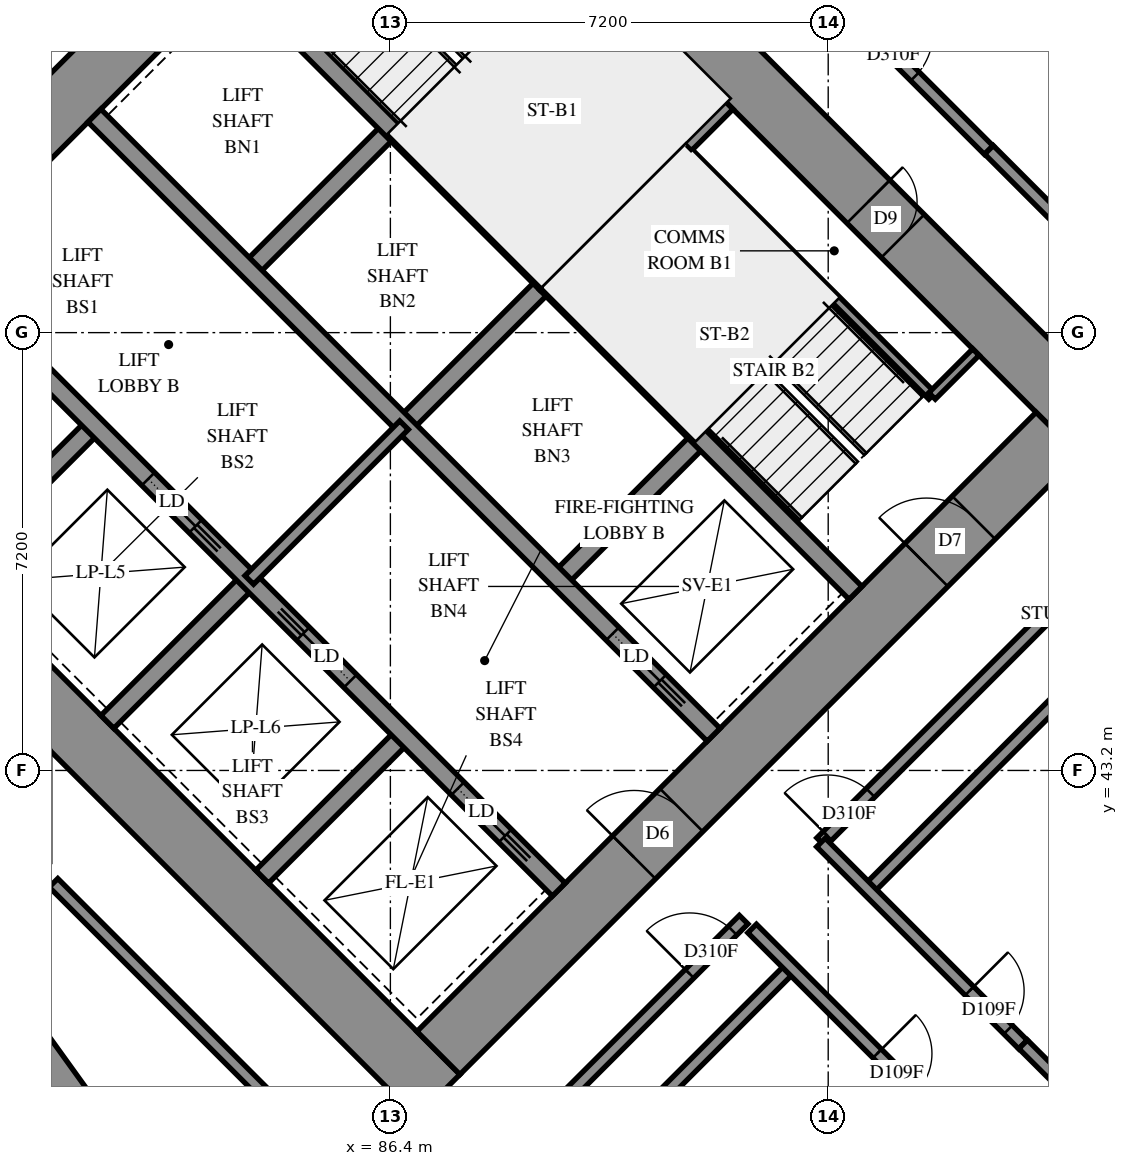
"""IFC4 building model, lengths in metres.
Left out: names, types, materials, properties, quantities, classifications, styles, units other than length and angle.
Written with IfcOpenShell. Run it as: python <this file> out.ifc"""

import sys

from ifc_helpers import new_model, si_unit, direction, frame, frame_2d, origin, place, context, subcontext, project, spatial, polyline, rectangle, outline, extrude, element, fill, save


model = new_model("IFC4")
c1 = context("Model", 3, precision=1e-05, world=origin(), true_north=direction((0.0, 1.0)))
c2 = subcontext(c1, "Body", "Model", "MODEL_VIEW")
j1 = project(units=[si_unit("LENGTHUNIT", "METRE"), si_unit("PLANEANGLEUNIT", "RADIAN")], contexts=[c1])
p1 = place(None, origin())
s1 = spatial("IfcSite", under=j1, at=p1, CompositionType="ELEMENT")
p2 = place(p1, origin())
s2 = spatial("IfcBuilding", under=s1, at=p2, CompositionType="ELEMENT")
p3 = place(p2, frame((0.0, 0.0, 64.4)))
s3 = spatial("IfcBuildingStorey", under=s2, at=p3, CompositionType="ELEMENT", Elevation=64.4)
p4 = place(p3, frame((75.594, 49.443, -0.3), z_axis=(0.0, 0.0, 1.0), x_axis=(0.7071037324, -0.70710983, 0.0)))
e1 = element("IfcWall", 1, at=p4, inside=s3, PredefinedType="SHEAR", context=c2, shape_type="SweptSolid", body=[
    extrude(rectangle(XDim=16.4, YDim=1.0, at=frame_2d((8.2, 0.0))), origin(), (0.0, 0.0, 1.0), 2.7),
])
p5 = place(p3, frame((86.483, 60.333, -0.3), z_axis=(0.0, 0.0, 1.0), x_axis=(0.70710983, -0.7071037324, 0.0)))
e2 = element("IfcWall", 2, at=p5, inside=s3, PredefinedType="SHEAR", context=c2, shape_type="SweptSolid", body=[
    extrude(rectangle(XDim=16.4, YDim=1.0, at=frame_2d((8.2, 0.0))), origin(), (0.0, 0.0, 1.0), 2.7),
])
p6 = place(p5, frame((11.0, 0.0, 0.3)))
e3 = element("IfcOpeningElement", 3, at=p6, cuts=e2, PredefinedType="OPENING", context=c2, shape_type="SweptSolid", body=[
    extrude(rectangle(XDim=0.8, YDim=2.1, at=frame_2d((0.4, 1.05))), frame((0.0, 0.51, 0.0), z_axis=(0.0, -1.0, 0.0), x_axis=(1.0, 0.0, 0.0)), (0.0, 0.0, 1.0), 1.02),
])
p7 = place(p3, frame((76.301, 49.443, -0.3), z_axis=(0.0, 0.0, 1.0), x_axis=(0.7071067812, 0.7071067812, 0.0)))
e4 = element("IfcWall", 4, at=p7, inside=s3, PredefinedType="SHEAR", context=c2, shape_type="SweptSolid", body=[
    extrude(rectangle(XDim=14.4, YDim=1.0, at=frame_2d((7.2, 0.0))), origin(), (0.0, 0.0, 1.0), 2.7),
])
p8 = place(p7, frame((4.55, 0.0, 0.3)))
e5 = element("IfcOpeningElement", 5, at=p8, cuts=e4, PredefinedType="OPENING", context=c2, shape_type="SweptSolid", body=[
    extrude(rectangle(XDim=1.1, YDim=2.1, at=frame_2d((0.55, 1.05))), frame((0.0, 0.51, 0.0), z_axis=(0.0, -1.0, 0.0), x_axis=(1.0, 0.0, 0.0)), (0.0, 0.0, 1.0), 1.02),
])
p9 = place(p7, frame((11.35, 0.0, 0.3)))
e6 = element("IfcOpeningElement", 6, at=p9, cuts=e4, PredefinedType="OPENING", context=c2, shape_type="SweptSolid", body=[
    extrude(rectangle(XDim=1.1, YDim=2.1, at=frame_2d((0.55, 1.05))), frame((0.0, 0.51, 0.0), z_axis=(0.0, -1.0, 0.0), x_axis=(1.0, 0.0, 0.0)), (0.0, 0.0, 1.0), 1.02),
])
p10 = place(p3, frame((87.19, 38.554, -0.3), z_axis=(0.0, 0.0, 1.0), x_axis=(0.707103309, 0.7071102534, 0.0)))
e7 = element("IfcWall", 7, at=p10, inside=s3, PredefinedType="SHEAR", context=c2, shape_type="SweptSolid", body=[
    extrude(rectangle(XDim=14.4, YDim=1.0, at=frame_2d((7.2, 0.0))), origin(), (0.0, 0.0, 1.0), 2.7),
])
p11 = place(p10, frame((4.55, 0.0, 0.3)))
e8 = element("IfcOpeningElement", 8, at=p11, cuts=e7, PredefinedType="OPENING", context=c2, shape_type="SweptSolid", body=[
    extrude(rectangle(XDim=1.1, YDim=2.1, at=frame_2d((0.55, 1.05))), frame((0.0, 0.51, 0.0), z_axis=(0.0, -1.0, 0.0), x_axis=(1.0, 0.0, 0.0)), (0.0, 0.0, 1.0), 1.02),
])
p12 = place(p10, frame((11.35, 0.0, 0.3)))
e9 = element("IfcOpeningElement", 9, at=p12, cuts=e7, PredefinedType="OPENING", context=c2, shape_type="SweptSolid", body=[
    extrude(rectangle(XDim=1.1, YDim=2.1, at=frame_2d((0.55, 1.05))), frame((0.0, 0.51, 0.0), z_axis=(0.0, -1.0, 0.0), x_axis=(1.0, 0.0, 0.0)), (0.0, 0.0, 1.0), 1.02),
])
for number, where, z_axis, x_axis in (
    (10, (79.2, 46.544, 0.0), (0.0, 0.0, 1.0), (0.707, 0.707, 0.0)),
    (11, (84.079, 51.423, 0.0), (0.0, 0.0, 1.0), (0.707, 0.707, 0.0)),
):
    element("IfcWall", number, at=place(p3, frame(where, z_axis=z_axis, x_axis=x_axis)), inside=s3, PredefinedType="SOLIDWALL", context=c2, shape_type="SweptSolid", body=[
        extrude(rectangle(XDim=3.3, YDim=0.3, at=frame_2d((1.65, 0.0))), origin(), (0.0, 0.0, 1.0), 3.1),
    ])
p13 = place(p3, frame((81.746, 43.999, 0.0), z_axis=(0.0, 0.0, 1.0), x_axis=(0.7071067812, 0.7071067812, 0.0)))
e12 = element("IfcWall", 12, at=p13, inside=s3, PredefinedType="SOLIDWALL", context=c2, shape_type="SweptSolid", body=[
    extrude(rectangle(XDim=3.3, YDim=0.3, at=frame_2d((1.65, 0.0))), origin(), (0.0, 0.0, 1.0), 3.1),
])
p14 = place(p3, frame((86.625, 48.878, 0.0), z_axis=(0.0, 0.0, 1.0), x_axis=(0.7071067812, 0.7071067812, 0.0)))
e13 = element("IfcWall", 13, at=p14, inside=s3, PredefinedType="SOLIDWALL", context=c2, shape_type="SweptSolid", body=[
    extrude(rectangle(XDim=3.3, YDim=0.3, at=frame_2d((1.65, 0.0))), origin(), (0.0, 0.0, 1.0), 3.1),
])
p15 = place(p3, frame((84.291, 41.453, 0.0), z_axis=(0.0, 0.0, 1.0), x_axis=(0.7071067812, 0.7071067812, 0.0)))
e14 = element("IfcWall", 14, at=p15, inside=s3, PredefinedType="SOLIDWALL", context=c2, shape_type="SweptSolid", body=[
    extrude(rectangle(XDim=3.3, YDim=0.3, at=frame_2d((1.65, 0.0))), origin(), (0.0, 0.0, 1.0), 3.1),
])
p16 = place(p3, frame((89.17, 46.332, 0.0), z_axis=(0.0, 0.0, 1.0), x_axis=(0.7071067812, 0.7071067812, 0.0)))
e15 = element("IfcWall", 15, at=p16, inside=s3, PredefinedType="SOLIDWALL", context=c2, shape_type="SweptSolid", body=[
    extrude(rectangle(XDim=3.3, YDim=0.3, at=frame_2d((1.65, 0.0))), origin(), (0.0, 0.0, 1.0), 3.1),
])
p17 = place(p3, frame((78.988, 51.423, 0.0), z_axis=(0.0, 0.0, 1.0), x_axis=(0.7071067812, -0.7071067812, 0.0)))
e16 = element("IfcWall", 16, at=p17, inside=s3, PredefinedType="SOLIDWALL", context=c2, shape_type="SweptSolid", body=[
    extrude(rectangle(XDim=14.4, YDim=0.3, at=frame_2d((7.2, 0.0))), origin(), (0.0, 0.0, 1.0), 3.1),
])
p18 = place(p17, frame((1.25, 0.0, 0.0)))
e17 = element("IfcOpeningElement", 17, at=p18, cuts=e16, PredefinedType="OPENING", context=c2, shape_type="SweptSolid", body=[
    extrude(rectangle(XDim=1.1, YDim=2.1, at=frame_2d((0.55, 1.05))), frame((0.0, 0.16, 0.0), z_axis=(0.0, -1.0, 0.0), x_axis=(1.0, 0.0, 0.0)), (0.0, 0.0, 1.0), 0.32),
])
p19 = place(p17, frame((4.85, 0.0, 0.0)))
e18 = element("IfcOpeningElement", 18, at=p19, cuts=e16, PredefinedType="OPENING", context=c2, shape_type="SweptSolid", body=[
    extrude(rectangle(XDim=1.1, YDim=2.1, at=frame_2d((0.55, 1.05))), frame((0.0, 0.16, 0.0), z_axis=(0.0, -1.0, 0.0), x_axis=(1.0, 0.0, 0.0)), (0.0, 0.0, 1.0), 0.32),
])
p20 = place(p17, frame((8.45, 0.0, 0.0)))
e19 = element("IfcOpeningElement", 19, at=p20, cuts=e16, PredefinedType="OPENING", context=c2, shape_type="SweptSolid", body=[
    extrude(rectangle(XDim=1.1, YDim=2.1, at=frame_2d((0.55, 1.05))), frame((0.0, 0.16, 0.0), z_axis=(0.0, -1.0, 0.0), x_axis=(1.0, 0.0, 0.0)), (0.0, 0.0, 1.0), 0.32),
])
p21 = place(p17, frame((12.05, 0.0, 0.0)))
e20 = element("IfcOpeningElement", 20, at=p21, cuts=e16, PredefinedType="OPENING", context=c2, shape_type="SweptSolid", body=[
    extrude(rectangle(XDim=1.1, YDim=2.1, at=frame_2d((0.55, 1.05))), frame((0.0, 0.16, 0.0), z_axis=(0.0, -1.0, 0.0), x_axis=(1.0, 0.0, 0.0)), (0.0, 0.0, 1.0), 0.32),
])
p22 = place(p3, frame((81.534, 53.969, 0.0), z_axis=(0.0, 0.0, 1.0), x_axis=(0.707103309, -0.7071102534, 0.0)))
e21 = element("IfcWall", 21, at=p22, inside=s3, PredefinedType="SOLIDWALL", context=c2, shape_type="SweptSolid", body=[
    extrude(rectangle(XDim=14.4, YDim=0.3, at=frame_2d((7.2, 0.0))), origin(), (0.0, 0.0, 1.0), 3.1),
])
p23 = place(p22, frame((12.05, 0.0, 0.0)))
e22 = element("IfcOpeningElement", 22, at=p23, cuts=e21, PredefinedType="OPENING", context=c2, shape_type="SweptSolid", body=[
    extrude(rectangle(XDim=1.1, YDim=2.1, at=frame_2d((0.55, 1.05))), frame((0.0, 0.16, 0.0), z_axis=(0.0, -1.0, 0.0), x_axis=(1.0, 0.0, 0.0)), (0.0, 0.0, 1.0), 0.32),
])
for number, where, z_axis, x_axis in (
    (23, (83.867, 56.302, 0.0), (0.0, 0.0, 1.0), (0.707, -0.707, 0.0)),
    (24, (88.958, 51.211, 0.0), (0.0, 0.0, 1.0), (0.707, -0.707, 0.0)),
):
    element("IfcWall", number, at=place(p3, frame(where, z_axis=z_axis, x_axis=x_axis)), inside=s3, PredefinedType="SOLIDWALL", context=c2, shape_type="SweptSolid", body=[
        extrude(rectangle(XDim=7.2, YDim=0.3, at=frame_2d((3.6, 0.0))), origin(), (0.0, 0.0, 1.0), 3.1),
    ])
p24 = place(p3, frame((88.958, 51.211, 0.0), z_axis=(0.0, 0.0, 1.0), x_axis=(0.7071067812, 0.7071067812, 0.0)))
e25 = element("IfcWall", 25, at=p24, inside=s3, PredefinedType="SOLIDWALL", context=c2, shape_type="SweptSolid", body=[
    extrude(rectangle(XDim=4.2, YDim=0.3, at=frame_2d((2.1, 0.0))), origin(), (0.0, 0.0, 1.0), 3.1),
])
p25 = place(p3, frame((99.031, 54.362, 0.0), z_axis=(0.0, 0.0, 1.0), x_axis=(-0.8229669617, 0.5680892359, 0.0)))
e26 = element("IfcWall", 26, at=p25, inside=s3, PredefinedType="SOLIDWALL", context=c2, shape_type="SweptSolid", body=[
    extrude(outline(polyline([(-0.05, -0.275), (3.445, -0.275), (3.546, 0.275), (0.05, 0.275), (-0.05, -0.275)])), origin(), (0.0, 0.0, 1.0), 3.1),
])
p26 = place(p25, frame((1.706, 0.0, 0.5)))
e27 = element("IfcOpeningElement", 27, at=p26, cuts=e26, PredefinedType="OPENING", context=c2, shape_type="SweptSolid", body=[
    extrude(rectangle(XDim=1.2, YDim=2.45, at=frame_2d((0.6, 1.225))), frame((0.0, 0.285, 0.0), z_axis=(0.0, -1.0, 0.0), x_axis=(1.0, 0.0, 0.0)), (0.0, 0.0, 1.0), 0.57),
])
p27 = place(p3, frame((80.238, 39.117, 0.0), z_axis=(0.0, 0.0, 1.0), x_axis=(0.5841722606, -0.8116297, 0.0)))
e28 = element("IfcWall", 28, at=p27, inside=s3, PredefinedType="SOLIDWALL", context=c2, shape_type="SweptSolid", body=[
    extrude(outline(polyline([(0.066, -0.275), (3.983, -0.275), (3.893, 0.275), (-0.066, 0.275), (0.066, -0.275)])), origin(), (0.0, 0.0, 1.0), 3.1),
])
p28 = place(p27, frame((1.862, 0.0, 0.5)))
e29 = element("IfcOpeningElement", 29, at=p28, cuts=e28, PredefinedType="OPENING", context=c2, shape_type="SweptSolid", body=[
    extrude(rectangle(XDim=1.2, YDim=2.45, at=frame_2d((0.6, 1.225))), frame((0.0, 0.285, 0.0), z_axis=(0.0, -1.0, 0.0), x_axis=(1.0, 0.0, 0.0)), (0.0, 0.0, 1.0), 0.57),
])
p29 = place(p3, frame((91.313, 53.354, 0.0), z_axis=(0.0, 0.0, 1.0), x_axis=(0.7071067812, -0.7071067812, 0.0)))
e30 = element("IfcWall", 30, at=p29, inside=s3, PredefinedType="PARTITIONING", context=c2, shape_type="SweptSolid", body=[
    extrude(rectangle(XDim=5.65, YDim=0.15, at=frame_2d((2.825, 0.0))), origin(), (0.0, 0.0, 1.0), 3.1),
])
p30 = place(p3, frame((95.308, 49.358, 0.0), z_axis=(0.0, 0.0, 1.0), x_axis=(0.70705776, 0.707155799, 0.0)))
e31 = element("IfcWall", 31, at=p30, inside=s3, PredefinedType="PARTITIONING", context=c2, shape_type="SweptSolid", body=[
    extrude(rectangle(XDim=1.02, YDim=0.15, at=frame_2d((0.51, 0.0))), origin(), (0.0, 0.0, 1.0), 3.1),
])
p31 = place(p3, frame((84.079, 46.332, 0.0), z_axis=(0.0, 0.0, 1.0), x_axis=(0.7071067812, 0.7071067812, 0.0)))
e32 = element("IfcWall", 32, at=p31, inside=s3, PredefinedType="PARTITIONING", context=c2, shape_type="SweptSolid", body=[
    extrude(rectangle(XDim=3.6, YDim=0.2, at=frame_2d((1.8, 0.0))), origin(), (0.0, 0.0, 1.0), 3.1),
])
p32 = place(p3, frame((86.833, 62.805, 0.0), z_axis=(0.0, 0.0, 1.0), x_axis=(0.7072045138, -0.7070090351, 0.0)))
e33 = element("IfcWall", 33, at=p32, inside=s3, PredefinedType="PARTITIONING", context=c2, shape_type="SweptSolid", body=[
    extrude(rectangle(XDim=13.301, YDim=0.2, at=frame_2d((6.65, 0.0))), origin(), (0.0, 0.0, 1.0), 3.1),
])
p33 = place(p32, frame((10.586, 0.0, 0.0)))
e34 = element("IfcOpeningElement", 34, at=p33, cuts=e33, PredefinedType="OPENING", context=c2, shape_type="SweptSolid", body=[
    extrude(rectangle(XDim=1.0, YDim=2.1, at=frame_2d((0.5, 1.05))), frame((0.0, 0.11, 0.0), z_axis=(0.0, -1.0, 0.0), x_axis=(1.0, 0.0, 0.0)), (0.0, 0.0, 1.0), 0.22),
])
p34 = place(p3, frame((94.259, 41.243, 0.0), z_axis=(0.0, 0.0, 1.0), x_axis=(0.7070206559, 0.7071928959, 0.0)))
e35 = element("IfcWall", 35, at=p34, inside=s3, PredefinedType="PARTITIONING", context=c2, shape_type="SweptSolid", body=[
    extrude(rectangle(XDim=12.192, YDim=0.2, at=frame_2d((6.096, 0.0))), origin(), (0.0, 0.0, 1.0), 3.1),
])
p35 = place(p3, frame((93.484, 42.02, 0.0), z_axis=(0.0, 0.0, 1.0), x_axis=(0.7071067812, 0.7071067812, 0.0)))
e36 = element("IfcWall", 36, at=p35, inside=s3, PredefinedType="PARTITIONING", context=c2, shape_type="SweptSolid", body=[
    extrude(rectangle(XDim=9.998, YDim=0.2, at=frame_2d((4.999, 0.0))), origin(), (0.0, 0.0, 1.0), 3.1),
])
p36 = place(p35, frame((0.148, 0.0, 0.0)))
e37 = element("IfcOpeningElement", 37, at=p36, cuts=e36, PredefinedType="OPENING", context=c2, shape_type="SweptSolid", body=[
    extrude(rectangle(XDim=1.0, YDim=2.1, at=frame_2d((0.5, 1.05))), frame((0.0, 0.11, 0.0), z_axis=(0.0, -1.0, 0.0), x_axis=(1.0, 0.0, 0.0)), (0.0, 0.0, 1.0), 0.22),
])
p37 = place(p3, frame((86.309, 33.281, 0.0), z_axis=(0.0, 0.0, 1.0), x_axis=(0.7069956745, 0.7072178704, 0.0)))
e38 = element("IfcWall", 38, at=p37, inside=s3, PredefinedType="PARTITIONING", context=c2, shape_type="SweptSolid", body=[
    extrude(rectangle(XDim=9.451, YDim=0.2, at=frame_2d((4.726, 0.0))), origin(), (0.0, 0.0, 1.0), 3.1),
])
p38 = place(p3, frame((92.349, 40.601, 0.0), z_axis=(0.0, 0.0, 1.0), x_axis=(0.7071067812, -0.7071067812, 0.0)))
e39 = element("IfcWall", 39, at=p38, inside=s3, PredefinedType="PARTITIONING", context=c2, shape_type="SweptSolid", body=[
    extrude(rectangle(XDim=8.101, YDim=0.2, at=frame_2d((4.05, 0.0))), origin(), (0.0, 0.0, 1.0), 3.1),
])
p39 = place(p38, frame((2.909, 0.0, 0.0)))
e40 = element("IfcOpeningElement", 40, at=p39, cuts=e39, PredefinedType="OPENING", context=c2, shape_type="SweptSolid", body=[
    extrude(rectangle(XDim=0.9, YDim=2.1, at=frame_2d((0.45, 1.05))), frame((0.0, 0.11, 0.0), z_axis=(0.0, -1.0, 0.0), x_axis=(1.0, 0.0, 0.0)), (0.0, 0.0, 1.0), 0.22),
])
p40 = place(p3, frame((86.836, 35.372, 0.0), z_axis=(0.0, 0.0, 1.0), x_axis=(0.7071067812, 0.7071067812, 0.0)))
e41 = element("IfcWall", 41, at=p40, inside=s3, PredefinedType="PARTITIONING", context=c2, shape_type="SweptSolid", body=[
    extrude(rectangle(XDim=7.6, YDim=0.2, at=frame_2d((3.8, 0.0))), origin(), (0.0, 0.0, 1.0), 3.1),
])
p41 = place(p40, frame((6.342, 0.0, 0.0)))
e42 = element("IfcOpeningElement", 42, at=p41, cuts=e41, PredefinedType="OPENING", context=c2, shape_type="SweptSolid", body=[
    extrude(rectangle(XDim=1.0, YDim=2.1, at=frame_2d((0.5, 1.05))), frame((0.0, 0.11, 0.0), z_axis=(0.0, -1.0, 0.0), x_axis=(1.0, 0.0, 0.0)), (0.0, 0.0, 1.0), 0.22),
])
p42 = place(p3, frame((85.07, 37.142, 0.0), z_axis=(0.0, 0.0, 1.0), x_axis=(-0.7070899851, 0.7071235769, 0.0)))
e43 = element("IfcWall", 43, at=p42, inside=s3, PredefinedType="PARTITIONING", context=c2, shape_type="SweptSolid", body=[
    extrude(rectangle(XDim=5.954, YDim=0.2, at=frame_2d((2.977, 0.0))), origin(), (0.0, 0.0, 1.0), 3.1),
])
p43 = place(p3, frame((93.481, 42.015, 0.0), z_axis=(0.0, 0.0, 1.0), x_axis=(0.7071067812, -0.7071067812, 0.0)))
e44 = element("IfcWall", 44, at=p43, inside=s3, PredefinedType="PARTITIONING", context=c2, shape_type="SweptSolid", body=[
    extrude(rectangle(XDim=4.698, YDim=0.2, at=frame_2d((2.349, 0.0))), origin(), (0.0, 0.0, 1.0), 3.1),
])
p44 = place(p43, frame((3.452, 0.0, 0.0)))
e45 = element("IfcOpeningElement", 45, at=p44, cuts=e44, PredefinedType="OPENING", context=c2, shape_type="SweptSolid", body=[
    extrude(rectangle(XDim=0.9, YDim=2.1, at=frame_2d((0.45, 1.05))), frame((0.0, 0.11, 0.0), z_axis=(0.0, -1.0, 0.0), x_axis=(1.0, 0.0, 0.0)), (0.0, 0.0, 1.0), 0.22),
])
p45 = place(p3, frame((96.244, 53.406, 0.0), z_axis=(0.0, 0.0, 1.0), x_axis=(0.7068288851, -0.7073845681, 0.0)))
e46 = element("IfcWall", 46, at=p45, inside=s3, PredefinedType="PARTITIONING", context=c2, shape_type="SweptSolid", body=[
    extrude(rectangle(XDim=3.599, YDim=0.2, at=frame_2d((1.8, 0.0))), origin(), (0.0, 0.0, 1.0), 3.1),
])
p46 = place(p3, frame((96.806, 38.696, 0.0), z_axis=(0.0, 0.0, 1.0), x_axis=(0.7076943229, -0.7065187509, 0.0)))
e47 = element("IfcWall", 47, at=p46, inside=s3, PredefinedType="PARTITIONING", context=c2, shape_type="SweptSolid", body=[
    extrude(rectangle(XDim=1.701, YDim=0.2, at=frame_2d((0.851, 0.0))), origin(), (0.0, 0.0, 1.0), 3.1),
])
p47 = place(p6, origin())
e48 = element("IfcDoor", 48, at=p47, inside=s3, OperationType="SINGLE_SWING_RIGHT", PredefinedType="DOOR", context=c2, shape_type="SweptSolid", body=[
    extrude(rectangle(XDim=0.8, YDim=2.1, at=frame_2d((0.4, 1.05))), frame((0.0, -0.44, 0.0), z_axis=(0.0, -1.0, 0.0), x_axis=(1.0, 0.0, 0.0)), (0.0, 0.0, 1.0), 0.05),
])
fill(e3, e48)
p48 = place(p11, origin())
e49 = element("IfcDoor", 49, at=p48, inside=s3, OperationType="DOUBLE_DOOR_SINGLE_SWING", PredefinedType="DOOR", context=c2, shape_type="SweptSolid", body=[
    extrude(rectangle(XDim=1.1, YDim=2.1, at=frame_2d((0.55, 1.05))), frame((0.0, 0.025, 0.0), z_axis=(0.0, -1.0, 0.0), x_axis=(1.0, 0.0, 0.0)), (0.0, 0.0, 1.0), 0.05),
])
fill(e8, e49)
p49 = place(p12, origin())
e50 = element("IfcDoor", 50, at=p49, inside=s3, OperationType="SINGLE_SWING_RIGHT", PredefinedType="DOOR", context=c2, shape_type="SweptSolid", body=[
    extrude(rectangle(XDim=1.1, YDim=2.1, at=frame_2d((0.55, 1.05))), frame((0.0, 0.025, 0.0), z_axis=(0.0, -1.0, 0.0), x_axis=(1.0, 0.0, 0.0)), (0.0, 0.0, 1.0), 0.05),
])
fill(e9, e50)
p50 = place(p19, origin())
e51 = element("IfcDoor", 51, at=p50, inside=s3, OperationType="SLIDING_TO_RIGHT", PredefinedType="DOOR", context=c2, shape_type="SweptSolid", body=[
    extrude(rectangle(XDim=1.1, YDim=2.1, at=frame_2d((0.55, 1.05))), frame((0.0, 0.025, 0.0), z_axis=(0.0, -1.0, 0.0), x_axis=(1.0, 0.0, 0.0)), (0.0, 0.0, 1.0), 0.05),
])
fill(e18, e51)
p51 = place(p20, origin())
e52 = element("IfcDoor", 52, at=p51, inside=s3, OperationType="SLIDING_TO_LEFT", PredefinedType="DOOR", context=c2, shape_type="SweptSolid", body=[
    extrude(rectangle(XDim=1.1, YDim=2.1, at=frame_2d((0.55, 1.05))), frame((0.0, 0.025, 0.0), z_axis=(0.0, -1.0, 0.0), x_axis=(1.0, 0.0, 0.0)), (0.0, 0.0, 1.0), 0.05),
])
fill(e19, e52)
p52 = place(p21, origin())
e53 = element("IfcDoor", 53, at=p52, inside=s3, OperationType="SLIDING_TO_RIGHT", PredefinedType="DOOR", context=c2, shape_type="SweptSolid", body=[
    extrude(rectangle(XDim=1.1, YDim=2.1, at=frame_2d((0.55, 1.05))), frame((0.0, 0.025, 0.0), z_axis=(0.0, -1.0, 0.0), x_axis=(1.0, 0.0, 0.0)), (0.0, 0.0, 1.0), 0.05),
])
fill(e20, e53)
p53 = place(p23, origin())
e54 = element("IfcDoor", 54, at=p53, inside=s3, OperationType="SLIDING_TO_RIGHT", PredefinedType="DOOR", context=c2, shape_type="SweptSolid", body=[
    extrude(rectangle(XDim=1.1, YDim=2.1, at=frame_2d((0.55, 1.05))), frame((0.0, 0.025, 0.0), z_axis=(0.0, -1.0, 0.0), x_axis=(1.0, 0.0, 0.0)), (0.0, 0.0, 1.0), 0.05),
])
fill(e22, e54)
p54 = place(p33, origin())
e55 = element("IfcDoor", 55, at=p54, inside=s3, OperationType="SINGLE_SWING_LEFT", PredefinedType="DOOR", context=c2, shape_type="SweptSolid", body=[
    extrude(rectangle(XDim=1.0, YDim=2.1, at=frame_2d((0.5, 1.05))), frame((0.0, 0.025, 0.0), z_axis=(0.0, -1.0, 0.0), x_axis=(1.0, 0.0, 0.0)), (0.0, 0.0, 1.0), 0.05),
])
fill(e34, e55)
p55 = place(p36, origin())
e56 = element("IfcDoor", 56, at=p55, inside=s3, OperationType="SINGLE_SWING_LEFT", PredefinedType="DOOR", context=c2, shape_type="SweptSolid", body=[
    extrude(rectangle(XDim=1.0, YDim=2.1, at=frame_2d((0.5, 1.05))), frame((0.0, 0.025, 0.0), z_axis=(0.0, -1.0, 0.0), x_axis=(1.0, 0.0, 0.0)), (0.0, 0.0, 1.0), 0.05),
])
fill(e37, e56)
p56 = place(p44, origin())
e57 = element("IfcDoor", 57, at=p56, inside=s3, OperationType="SINGLE_SWING_RIGHT", PredefinedType="DOOR", context=c2, shape_type="SweptSolid", body=[
    extrude(rectangle(XDim=0.9, YDim=2.1, at=frame_2d((0.45, 1.05))), frame((0.0, 0.025, 0.0), z_axis=(0.0, -1.0, 0.0), x_axis=(1.0, 0.0, 0.0)), (0.0, 0.0, 1.0), 0.05),
])
fill(e45, e57)
p57 = place(p41, origin())
e58 = element("IfcDoor", 58, at=p57, inside=s3, OperationType="SINGLE_SWING_RIGHT", PredefinedType="DOOR", context=c2, shape_type="SweptSolid", body=[
    extrude(rectangle(XDim=1.0, YDim=2.1, at=frame_2d((0.5, 1.05))), frame((0.0, 0.025, 0.0), z_axis=(0.0, -1.0, 0.0), x_axis=(1.0, 0.0, 0.0)), (0.0, 0.0, 1.0), 0.05),
])
fill(e42, e58)
p58 = place(p39, origin())
e59 = element("IfcDoor", 59, at=p58, inside=s3, OperationType="SINGLE_SWING_LEFT", PredefinedType="DOOR", context=c2, shape_type="SweptSolid", body=[
    extrude(rectangle(XDim=0.9, YDim=2.1, at=frame_2d((0.45, 1.05))), frame((0.0, 0.025, 0.0), z_axis=(0.0, -1.0, 0.0), x_axis=(1.0, 0.0, 0.0)), (0.0, 0.0, 1.0), 0.05),
])
fill(e40, e59)
save(model, sys.argv[1])
